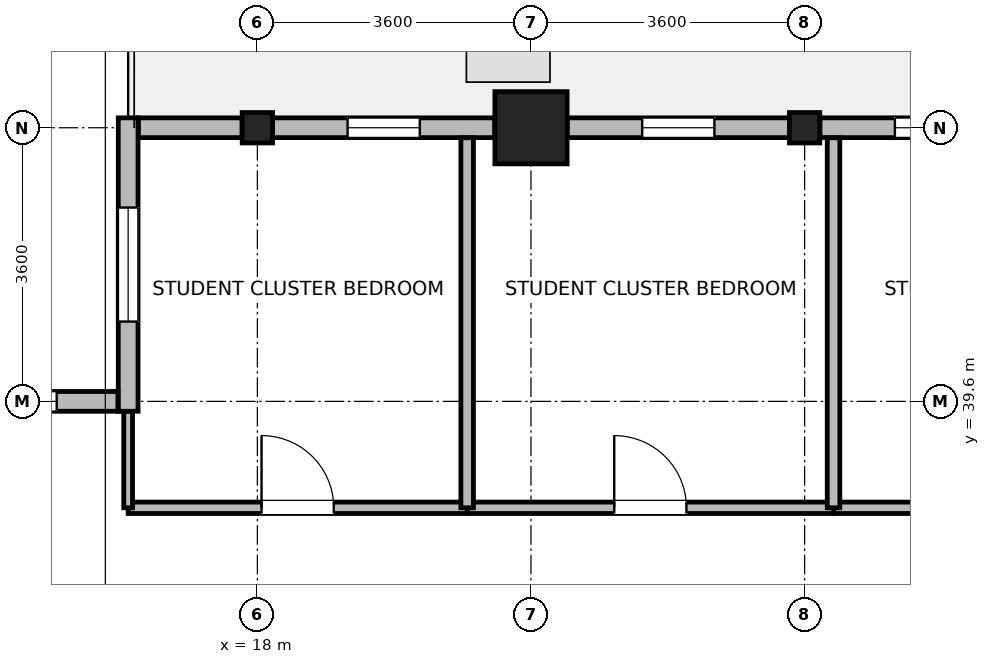
"""IFC4 building model, lengths in metres.
Left out: names, types, materials, properties, quantities, classifications, styles, units other than length and angle.
Written with IfcOpenShell. Run it as: python <this file> out.ifc"""

import sys

from ifc_helpers import new_model, si_unit, direction, frame, frame_2d, origin, origin_2d, place, context, subcontext, project, spatial, rectangle, i_section, extrude, source, transform, mapped, element, fill, save


model = new_model("IFC4")
c1 = context("Model", 3, precision=1e-05, world=origin(), true_north=direction((0.0, 1.0)))
c2 = subcontext(c1, "Body", "Model", "MODEL_VIEW")
j1 = project(units=[si_unit("LENGTHUNIT", "METRE"), si_unit("PLANEANGLEUNIT", "RADIAN")], contexts=[c1])
p1 = place(None, origin())
s1 = spatial("IfcSite", under=j1, at=p1, CompositionType="ELEMENT")
p2 = place(p1, origin())
s2 = spatial("IfcBuilding", under=s1, at=p2, CompositionType="ELEMENT")
p3 = place(p2, frame((0.0, 0.0, 227.7)))
s3 = spatial("IfcBuildingStorey", under=s2, at=p3, CompositionType="ELEMENT", Elevation=227.7)
m1 = source(origin(), c2, "Body", "SweptSolid", [
    extrude(rectangle(XDim=0.95, YDim=0.95, at=origin_2d()), origin(), (0.0, 0.0, 1.0), 3.7),
])
p4 = place(p3, frame((21.6, 43.2, 0.0), z_axis=(0.0, 0.0, 1.0), x_axis=(1.0, 0.0, 0.0)))
e1 = element("IfcColumn", 1, at=p4, inside=s3, PredefinedType="COLUMN", context=c2, shape_type="MappedRepresentation", body=[
    mapped(m1, transform((0.0, 0.0, 0.0), x_axis=(1.0, 0.0, 0.0), y_axis=(0.0, 1.0, 0.0), z_axis=(0.0, 0.0, 1.0), scale=1.0)),
])
m2 = source(origin(), c2, "Body", "SweptSolid", [
    extrude(i_section(OverallWidth=0.399, OverallDepth=0.4, WebThickness=0.017, FlangeThickness=0.023, FilletRadius=0.015, at=origin_2d()), origin(), (0.0, 0.0, 1.0), 3.7),
])
for number, where, z_axis, x_axis in (
    (2, (18.0, 43.2, 0.0), (0.0, 0.0, 1.0), (1.0, 0.0, 0.0)),
    (3, (25.2, 43.2, 0.0), (0.0, 0.0, 1.0), (1.0, 0.0, 0.0)),
):
    element("IfcColumn", number, at=place(p3, frame(where, z_axis=z_axis, x_axis=x_axis)), inside=s3, PredefinedType="COLUMN", context=c2, shape_type="MappedRepresentation", body=[
        mapped(m2, transform((0.0, 0.0, 0.0), x_axis=(1.0, 0.0, 0.0), y_axis=(0.0, 1.0, 0.0), z_axis=(0.0, 0.0, 1.0), scale=1.0)),
    ])
p5 = place(p3, frame((25.4, 43.2, 0.0), z_axis=(0.0, 0.0, 1.0), x_axis=(1.0, 0.0, 0.0)))
e4 = element("IfcWall", 4, at=p5, inside=s3, PredefinedType="STANDARD", context=c2, shape_type="SweptSolid", body=[
    extrude(rectangle(XDim=2.924, YDim=0.26, at=frame_2d((1.462, 0.0))), origin(), (0.0, 0.0, 1.0), 3.05),
])
p6 = place(p5, frame((0.987, 0.0, 0.85)))
e5 = element("IfcOpeningElement", 5, at=p6, cuts=e4, PredefinedType="OPENING", context=c2, shape_type="SweptSolid", body=[
    extrude(rectangle(XDim=0.95, YDim=1.75, at=frame_2d((0.475, 0.875))), frame((0.0, 0.14, 0.0), z_axis=(0.0, -1.0, 0.0), x_axis=(1.0, 0.0, 0.0)), (0.0, 0.0, 1.0), 0.28),
])
p7 = place(p3, frame((22.076, 43.2, 0.0), z_axis=(0.0, 0.0, 1.0), x_axis=(1.0, 0.0, 0.0)))
e6 = element("IfcWall", 6, at=p7, inside=s3, PredefinedType="STANDARD", context=c2, shape_type="SweptSolid", body=[
    extrude(rectangle(XDim=2.924, YDim=0.26, at=frame_2d((1.462, 0.0))), origin(), (0.0, 0.0, 1.0), 3.05),
])
p8 = place(p7, frame((0.987, 0.0, 0.85)))
e7 = element("IfcOpeningElement", 7, at=p8, cuts=e6, PredefinedType="OPENING", context=c2, shape_type="SweptSolid", body=[
    extrude(rectangle(XDim=0.95, YDim=1.75, at=frame_2d((0.475, 0.875))), frame((0.0, 0.14, 0.0), z_axis=(0.0, -1.0, 0.0), x_axis=(1.0, 0.0, 0.0)), (0.0, 0.0, 1.0), 0.28),
])
p9 = place(p3, frame((18.2, 43.2, 0.0), z_axis=(0.0, 0.0, 1.0), x_axis=(1.0, 0.0, 0.0)))
e8 = element("IfcWall", 8, at=p9, inside=s3, PredefinedType="STANDARD", context=c2, shape_type="SweptSolid", body=[
    extrude(rectangle(XDim=2.924, YDim=0.26, at=frame_2d((1.462, 0.0))), origin(), (0.0, 0.0, 1.0), 3.05),
])
p10 = place(p9, frame((0.987, 0.0, 0.85)))
e9 = element("IfcOpeningElement", 9, at=p10, cuts=e8, PredefinedType="OPENING", context=c2, shape_type="SweptSolid", body=[
    extrude(rectangle(XDim=0.95, YDim=1.75, at=frame_2d((0.475, 0.875))), frame((0.0, 0.14, 0.0), z_axis=(0.0, -1.0, 0.0), x_axis=(1.0, 0.0, 0.0)), (0.0, 0.0, 1.0), 0.28),
])
p11 = place(p3, frame((16.435, 43.2, 0.0), z_axis=(0.0, 0.0, 1.0), x_axis=(1.0, 0.0, 0.0)))
e10 = element("IfcWall", 10, at=p11, inside=s3, PredefinedType="STANDARD", context=c2, shape_type="SweptSolid", body=[
    extrude(rectangle(XDim=1.365, YDim=0.26, at=frame_2d((0.682, 0.0))), origin(), (0.0, 0.0, 1.0), 3.05),
])
p12 = place(p3, frame((16.3, 39.47, 0.0), z_axis=(0.0, 0.0, 1.0), x_axis=(0.0, 1.0, 0.0)))
e11 = element("IfcWall", 11, at=p12, inside=s3, PredefinedType="STANDARD", context=c2, shape_type="SweptSolid", body=[
    extrude(rectangle(XDim=3.86, YDim=0.26, at=frame_2d((1.93, 0.0))), origin(), (0.0, 0.0, 1.0), 3.45),
])
p13 = place(p12, frame((1.18, 0.0, 0.85)))
e12 = element("IfcOpeningElement", 12, at=p13, cuts=e11, PredefinedType="OPENING", context=c2, shape_type="SweptSolid", body=[
    extrude(rectangle(XDim=1.5, YDim=1.85, at=frame_2d((0.75, 0.925))), frame((0.0, 0.14, 0.0), z_axis=(0.0, -1.0, 0.0), x_axis=(1.0, 0.0, 0.0)), (0.0, 0.0, 1.0), 0.28),
])
p14 = place(p3, frame((6.835, 39.6, 0.0), z_axis=(0.0, 0.0, 1.0), x_axis=(1.0, 0.0, 0.0)))
e13 = element("IfcWall", 13, at=p14, inside=s3, PredefinedType="STANDARD", context=c2, shape_type="SweptSolid", body=[
    extrude(rectangle(XDim=9.33, YDim=0.26, at=frame_2d((4.665, 0.0))), origin(), (0.0, 0.0, 1.0), 3.45),
])
p15 = place(p14, frame((0.805, 0.0, 0.85)))
e14 = element("IfcOpeningElement", 14, at=p15, cuts=e13, PredefinedType="OPENING", context=c2, shape_type="SweptSolid", body=[
    extrude(rectangle(XDim=1.5, YDim=1.85, at=frame_2d((0.75, 0.925))), frame((0.0, 0.14, 0.0), z_axis=(0.0, -1.0, 0.0), x_axis=(1.0, 0.0, 0.0)), (0.0, 0.0, 1.0), 0.28),
])
p16 = place(p14, frame((3.915, 0.0, 0.85)))
e15 = element("IfcOpeningElement", 15, at=p16, cuts=e13, PredefinedType="OPENING", context=c2, shape_type="SweptSolid", body=[
    extrude(rectangle(XDim=1.5, YDim=1.85, at=frame_2d((0.75, 0.925))), frame((0.0, 0.14, 0.0), z_axis=(0.0, -1.0, 0.0), x_axis=(1.0, 0.0, 0.0)), (0.0, 0.0, 1.0), 0.28),
])
p17 = place(p14, frame((7.025, 0.0, 0.85)))
e16 = element("IfcOpeningElement", 16, at=p17, cuts=e13, PredefinedType="OPENING", context=c2, shape_type="SweptSolid", body=[
    extrude(rectangle(XDim=1.5, YDim=1.85, at=frame_2d((0.75, 0.925))), frame((0.0, 0.14, 0.0), z_axis=(0.0, -1.0, 0.0), x_axis=(1.0, 0.0, 0.0)), (0.0, 0.0, 1.0), 0.28),
])
p18 = place(p3, frame((25.58, 38.2, 0.0), z_axis=(0.0, 0.0, 1.0), x_axis=(1.0, 0.0, 0.0)))
e17 = element("IfcWall", 17, at=p18, inside=s3, PredefinedType="PARTITIONING", context=c2, shape_type="SweptSolid", body=[
    extrude(rectangle(XDim=5.16, YDim=0.15, at=frame_2d((2.58, 0.0))), origin(), (0.0, 0.0, 1.0), 3.45),
])
p19 = place(p18, frame((2.105, 0.0, 0.0)))
e18 = element("IfcOpeningElement", 18, at=p19, cuts=e17, PredefinedType="OPENING", context=c2, shape_type="SweptSolid", body=[
    extrude(rectangle(XDim=0.95, YDim=2.1, at=frame_2d((0.475, 1.05))), frame((0.0, 0.085, 0.0), z_axis=(0.0, -1.0, 0.0), x_axis=(1.0, 0.0, 0.0)), (0.0, 0.0, 1.0), 0.17),
])
p20 = place(p3, frame((20.76, 38.2, 0.0), z_axis=(0.0, 0.0, 1.0), x_axis=(1.0, 0.0, 0.0)))
e19 = element("IfcWall", 19, at=p20, inside=s3, PredefinedType="PARTITIONING", context=c2, shape_type="SweptSolid", body=[
    extrude(rectangle(XDim=4.82, YDim=0.15, at=frame_2d((2.41, 0.0))), origin(), (0.0, 0.0, 1.0), 3.45),
])
p21 = place(p20, frame((1.935, 0.0, 0.0)))
e20 = element("IfcOpeningElement", 20, at=p21, cuts=e19, PredefinedType="OPENING", context=c2, shape_type="SweptSolid", body=[
    extrude(rectangle(XDim=0.95, YDim=2.1, at=frame_2d((0.475, 1.05))), frame((0.0, 0.085, 0.0), z_axis=(0.0, -1.0, 0.0), x_axis=(1.0, 0.0, 0.0)), (0.0, 0.0, 1.0), 0.17),
])
p22 = place(p3, frame((16.3, 38.2, 0.0), z_axis=(0.0, 0.0, 1.0), x_axis=(1.0, 0.0, 0.0)))
e21 = element("IfcWall", 21, at=p22, inside=s3, PredefinedType="PARTITIONING", context=c2, shape_type="SweptSolid", body=[
    extrude(rectangle(XDim=4.46, YDim=0.15, at=frame_2d((2.23, 0.0))), origin(), (0.0, 0.0, 1.0), 3.45),
])
p23 = place(p22, frame((1.755, 0.0, 0.0)))
e22 = element("IfcOpeningElement", 22, at=p23, cuts=e21, PredefinedType="OPENING", context=c2, shape_type="SweptSolid", body=[
    extrude(rectangle(XDim=0.95, YDim=2.1, at=frame_2d((0.475, 1.05))), frame((0.0, 0.085, 0.0), z_axis=(0.0, -1.0, 0.0), x_axis=(1.0, 0.0, 0.0)), (0.0, 0.0, 1.0), 0.17),
])
p24 = place(p3, frame((16.3, 38.2, 0.0), z_axis=(0.0, 0.0, 1.0), x_axis=(0.0, 1.0, 0.0)))
e23 = element("IfcWall", 23, at=p24, inside=s3, PredefinedType="PARTITIONING", context=c2, shape_type="SweptSolid", body=[
    extrude(rectangle(XDim=1.268, YDim=0.115, at=frame_2d((0.634, 0.0))), origin(), (0.0, 0.0, 1.0), 3.45),
])
for number, where, z_axis, x_axis in (
    (24, (20.76, 38.2, 0.0), (0.0, 0.0, 1.0), (0.0, 1.0, 0.0)),
    (25, (25.58, 38.2, 0.0), (0.0, 0.0, 1.0), (0.0, 1.0, 0.0)),
):
    element("IfcWall", number, at=place(p3, frame(where, z_axis=z_axis, x_axis=x_axis)), inside=s3, PredefinedType="PARTITIONING", context=c2, shape_type="SweptSolid", body=[
        extrude(rectangle(XDim=4.868, YDim=0.165, at=frame_2d((2.434, 0.0))), origin(), (0.0, 0.0, 1.0), 3.45),
    ])
p25 = place(p6, origin())
e26 = element("IfcWindow", 26, at=p25, inside=s3, PartitioningType="SINGLE_PANEL", PredefinedType="WINDOW", context=c2, shape_type="SweptSolid", body=[
    extrude(rectangle(XDim=0.95, YDim=1.75, at=frame_2d((0.475, 0.875))), frame((0.0, 0.03, 0.0), z_axis=(0.0, -1.0, 0.0), x_axis=(1.0, 0.0, 0.0)), (0.0, 0.0, 1.0), 0.06),
])
fill(e5, e26)
p26 = place(p8, origin())
e27 = element("IfcWindow", 27, at=p26, inside=s3, PartitioningType="SINGLE_PANEL", PredefinedType="WINDOW", context=c2, shape_type="SweptSolid", body=[
    extrude(rectangle(XDim=0.95, YDim=1.75, at=frame_2d((0.475, 0.875))), frame((0.0, 0.03, 0.0), z_axis=(0.0, -1.0, 0.0), x_axis=(1.0, 0.0, 0.0)), (0.0, 0.0, 1.0), 0.06),
])
fill(e7, e27)
p27 = place(p10, origin())
e28 = element("IfcWindow", 28, at=p27, inside=s3, PartitioningType="SINGLE_PANEL", PredefinedType="WINDOW", context=c2, shape_type="SweptSolid", body=[
    extrude(rectangle(XDim=0.95, YDim=1.75, at=frame_2d((0.475, 0.875))), frame((0.0, 0.03, 0.0), z_axis=(0.0, -1.0, 0.0), x_axis=(1.0, 0.0, 0.0)), (0.0, 0.0, 1.0), 0.06),
])
fill(e9, e28)
p28 = place(p13, origin())
e29 = element("IfcWindow", 29, at=p28, inside=s3, PartitioningType="SINGLE_PANEL", PredefinedType="WINDOW", context=c2, shape_type="SweptSolid", body=[
    extrude(rectangle(XDim=1.5, YDim=1.85, at=frame_2d((0.75, 0.925))), frame((0.0, 0.03, 0.0), z_axis=(0.0, -1.0, 0.0), x_axis=(1.0, 0.0, 0.0)), (0.0, 0.0, 1.0), 0.06),
])
fill(e12, e29)
p29 = place(p17, origin())
e30 = element("IfcWindow", 30, at=p29, inside=s3, PartitioningType="SINGLE_PANEL", PredefinedType="WINDOW", context=c2, shape_type="SweptSolid", body=[
    extrude(rectangle(XDim=1.5, YDim=1.85, at=frame_2d((0.75, 0.925))), frame((0.0, 0.03, 0.0), z_axis=(0.0, -1.0, 0.0), x_axis=(1.0, 0.0, 0.0)), (0.0, 0.0, 1.0), 0.06),
])
fill(e16, e30)
p30 = place(p21, origin())
e31 = element("IfcDoor", 31, at=p30, inside=s3, OperationType="SINGLE_SWING_LEFT", PredefinedType="DOOR", context=c2, shape_type="SweptSolid", body=[
    extrude(rectangle(XDim=0.95, YDim=2.1, at=frame_2d((0.475, 1.05))), frame((0.0, 0.025, 0.0), z_axis=(0.0, -1.0, 0.0), x_axis=(1.0, 0.0, 0.0)), (0.0, 0.0, 1.0), 0.05),
])
fill(e20, e31)
p31 = place(p23, origin())
e32 = element("IfcDoor", 32, at=p31, inside=s3, OperationType="SINGLE_SWING_LEFT", PredefinedType="DOOR", context=c2, shape_type="SweptSolid", body=[
    extrude(rectangle(XDim=0.95, YDim=2.1, at=frame_2d((0.475, 1.05))), frame((0.0, 0.025, 0.0), z_axis=(0.0, -1.0, 0.0), x_axis=(1.0, 0.0, 0.0)), (0.0, 0.0, 1.0), 0.05),
])
fill(e22, e32)
save(model, sys.argv[1])
